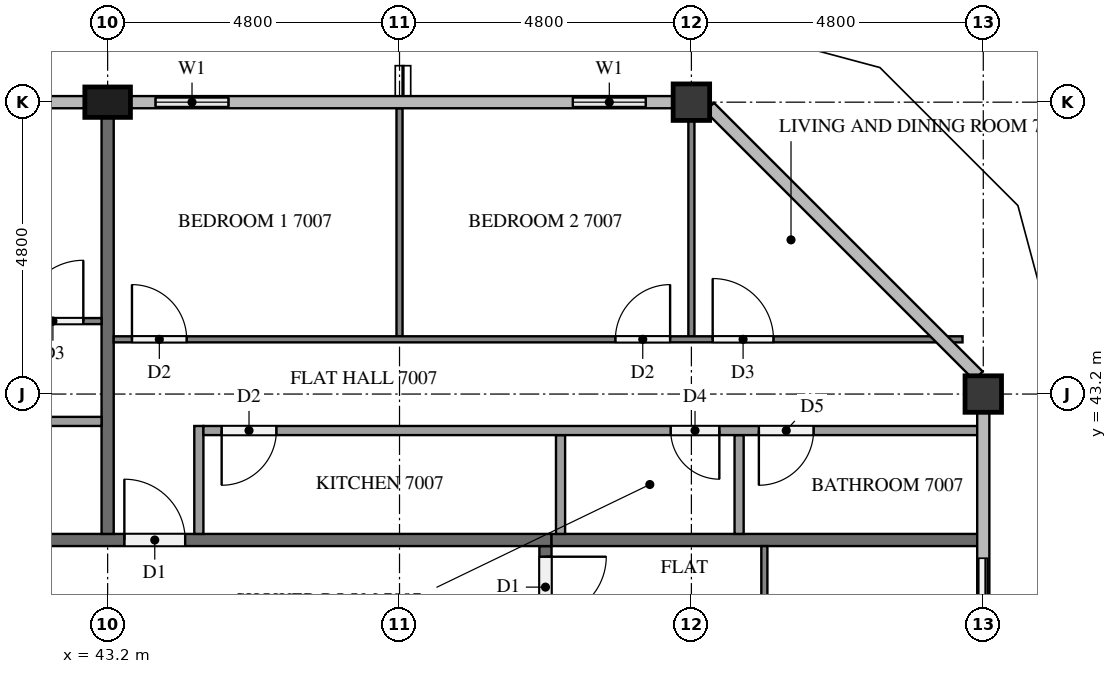
"""IFC4 building model, lengths in metres.
Left out: names, types, materials, properties, quantities, classifications, styles, units other than length and angle.
Written with IfcOpenShell. Run it as: python <this file> out.ifc"""

import sys

from ifc_helpers import new_model, si_unit, direction, frame, frame_2d, origin, origin_2d, place, context, subcontext, project, spatial, rectangle, extrude, element, fill, save


model = new_model("IFC4")
c1 = context("Model", 3, precision=1e-05, world=origin(), true_north=direction((0.0, 1.0)))
c2 = subcontext(c1, "Body", "Model", "MODEL_VIEW")
j1 = project(units=[si_unit("LENGTHUNIT", "METRE"), si_unit("PLANEANGLEUNIT", "RADIAN")], contexts=[c1])
p1 = place(None, origin())
s1 = spatial("IfcSite", under=j1, at=p1, CompositionType="ELEMENT")
p2 = place(p1, origin())
s2 = spatial("IfcBuilding", under=s1, at=p2, CompositionType="ELEMENT")
p3 = place(p2, frame((0.0, 0.0, 268.6)))
s3 = spatial("IfcBuildingStorey", under=s2, at=p3, CompositionType="ELEMENT", Elevation=268.6)
for number, where, z_axis, x_axis in (
    (1, (57.6, 43.2, 0.0), (0.0, 0.0, 1.0), (1.0, 0.0, 0.0)),
    (2, (52.8, 48.0, 0.0), (0.0, 0.0, 1.0), (1.0, 0.0, 0.0)),
):
    element("IfcColumn", number, at=place(p3, frame(where, z_axis=z_axis, x_axis=x_axis)), inside=s3, PredefinedType="COLUMN", context=c2, shape_type="SweptSolid", body=[
        extrude(rectangle(XDim=0.6, YDim=0.6, at=origin_2d()), origin(), (0.0, 0.0, 1.0), 3.2),
    ])
p4 = place(p3, frame((43.2, 48.0, 0.0), z_axis=(0.0, 0.0, 1.0), x_axis=(1.0, 0.0, 0.0)))
e3 = element("IfcColumn", 3, at=p4, inside=s3, PredefinedType="COLUMN", context=c2, shape_type="SweptSolid", body=[
    extrude(rectangle(XDim=0.75, YDim=0.5, at=origin_2d()), origin(), (0.0, 0.0, 1.0), 3.2),
])
p5 = place(p3, frame((57.6, 38.4, 0.0), z_axis=(0.0, 0.0, 1.0), x_axis=(0.0, 1.0, 0.0)))
e4 = element("IfcWall", 4, at=p5, inside=s3, PredefinedType="SOLIDWALL", context=c2, shape_type="SweptSolid", body=[
    extrude(rectangle(XDim=2.4, YDim=0.15, at=frame_2d((1.2, 0.0))), origin(), (0.0, 0.0, 1.0), 3.2),
])
p6 = place(p5, frame((0.3, 0.0, 0.0)))
e5 = element("IfcOpeningElement", 5, at=p6, cuts=e4, PredefinedType="OPENING", context=c2, shape_type="SweptSolid", body=[
    extrude(rectangle(XDim=1.8, YDim=2.4, at=frame_2d((0.9, 1.2))), frame((0.0, 0.085, 0.0), z_axis=(0.0, -1.0, 0.0), x_axis=(1.0, 0.0, 0.0)), (0.0, 0.0, 1.0), 0.17),
])
p7 = place(p3, frame((52.5, 48.0, 0.0), z_axis=(0.0, 0.0, 1.0), x_axis=(-1.0, 0.0, 0.0)))
e6 = element("IfcWall", 6, at=p7, inside=s3, PredefinedType="SOLIDWALL", context=c2, shape_type="SweptSolid", body=[
    extrude(rectangle(XDim=2.1, YDim=0.15, at=frame_2d((1.05, 0.0))), origin(), (0.0, 0.0, 1.0), 3.2),
])
p8 = place(p7, frame((0.45, 0.0, 0.9)))
e7 = element("IfcOpeningElement", 7, at=p8, cuts=e6, PredefinedType="OPENING", context=c2, shape_type="SweptSolid", body=[
    extrude(rectangle(XDim=1.2, YDim=1.4, at=frame_2d((0.6, 0.7))), frame((0.0, 0.085, 0.0), z_axis=(0.0, -1.0, 0.0), x_axis=(1.0, 0.0, 0.0)), (0.0, 0.0, 1.0), 0.17),
])
p9 = place(p3, frame((45.6, 48.0, 0.0), z_axis=(0.0, 0.0, 1.0), x_axis=(-1.0, 0.0, 0.0)))
e8 = element("IfcWall", 8, at=p9, inside=s3, PredefinedType="SOLIDWALL", context=c2, shape_type="SweptSolid", body=[
    extrude(rectangle(XDim=2.025, YDim=0.15, at=frame_2d((1.013, 0.0))), origin(), (0.0, 0.0, 1.0), 3.2),
])
p10 = place(p9, frame((0.413, 0.0, 0.9)))
e9 = element("IfcOpeningElement", 9, at=p10, cuts=e8, PredefinedType="OPENING", context=c2, shape_type="SweptSolid", body=[
    extrude(rectangle(XDim=1.2, YDim=1.4, at=frame_2d((0.6, 0.7))), frame((0.0, 0.085, 0.0), z_axis=(0.0, -1.0, 0.0), x_axis=(1.0, 0.0, 0.0)), (0.0, 0.0, 1.0), 0.17),
])
p11 = place(p3, frame((50.4, 40.7, 0.0), z_axis=(0.0, 0.0, 1.0), x_axis=(0.0, -1.0, 0.0)))
e10 = element("IfcWall", 10, at=p11, inside=s3, PredefinedType="PARTITIONING", context=c2, shape_type="SweptSolid", body=[
    extrude(rectangle(XDim=28.6, YDim=0.2, at=frame_2d((14.3, 0.0))), origin(), (0.0, 0.0, 1.0), 3.2),
])
p12 = place(p11, frame((27.425, 0.0, 0.0)))
e11 = element("IfcOpeningElement", 11, at=p12, cuts=e10, PredefinedType="OPENING", context=c2, shape_type="SweptSolid", body=[
    extrude(rectangle(XDim=1.0, YDim=2.1, at=frame_2d((0.5, 1.05))), frame((0.0, 0.11, 0.0), z_axis=(0.0, -1.0, 0.0), x_axis=(1.0, 0.0, 0.0)), (0.0, 0.0, 1.0), 0.22),
])
p13 = place(p11, frame((0.175, 0.0, 0.0)))
e12 = element("IfcOpeningElement", 12, at=p13, cuts=e10, PredefinedType="OPENING", context=c2, shape_type="SweptSolid", body=[
    extrude(rectangle(XDim=1.0, YDim=2.1, at=frame_2d((0.5, 1.05))), frame((0.0, 0.11, 0.0), z_axis=(0.0, -1.0, 0.0), x_axis=(1.0, 0.0, 0.0)), (0.0, 0.0, 1.0), 0.22),
])
p14 = place(p3, frame((11.9, 40.8, 0.0), z_axis=(0.0, 0.0, 1.0), x_axis=(1.0, 0.0, 0.0)))
e13 = element("IfcWall", 13, at=p14, inside=s3, PredefinedType="PARTITIONING", context=c2, shape_type="SweptSolid", body=[
    extrude(rectangle(XDim=38.6, YDim=0.2, at=frame_2d((19.3, 0.0))), origin(), (0.0, 0.0, 1.0), 3.2),
])
p15 = place(p14, frame((31.575, 0.0, 0.0)))
e14 = element("IfcOpeningElement", 14, at=p15, cuts=e13, PredefinedType="OPENING", context=c2, shape_type="SweptSolid", body=[
    extrude(rectangle(XDim=1.0, YDim=2.1, at=frame_2d((0.5, 1.05))), frame((0.0, 0.11, 0.0), z_axis=(0.0, -1.0, 0.0), x_axis=(1.0, 0.0, 0.0)), (0.0, 0.0, 1.0), 0.22),
])
p16 = place(p14, frame((24.375, 0.0, 0.0)))
e15 = element("IfcOpeningElement", 15, at=p16, cuts=e13, PredefinedType="OPENING", context=c2, shape_type="SweptSolid", body=[
    extrude(rectangle(XDim=1.0, YDim=2.1, at=frame_2d((0.5, 1.05))), frame((0.0, 0.11, 0.0), z_axis=(0.0, -1.0, 0.0), x_axis=(1.0, 0.0, 0.0)), (0.0, 0.0, 1.0), 0.22),
])
p17 = place(p14, frame((22.825, 0.0, 0.0)))
e16 = element("IfcOpeningElement", 16, at=p17, cuts=e13, PredefinedType="OPENING", context=c2, shape_type="SweptSolid", body=[
    extrude(rectangle(XDim=1.0, YDim=2.1, at=frame_2d((0.5, 1.05))), frame((0.0, 0.11, 0.0), z_axis=(0.0, -1.0, 0.0), x_axis=(1.0, 0.0, 0.0)), (0.0, 0.0, 1.0), 0.22),
])
p18 = place(p14, frame((0.375, 0.0, 0.0)))
e17 = element("IfcOpeningElement", 17, at=p18, cuts=e13, PredefinedType="OPENING", context=c2, shape_type="SweptSolid", body=[
    extrude(rectangle(XDim=1.0, YDim=2.1, at=frame_2d((0.5, 1.05))), frame((0.0, 0.11, 0.0), z_axis=(0.0, -1.0, 0.0), x_axis=(1.0, 0.0, 0.0)), (0.0, 0.0, 1.0), 0.22),
])
p19 = place(p3, frame((50.5, 40.8, 0.0), z_axis=(0.0, 0.0, 1.0), x_axis=(1.0, 0.0, 0.0)))
e18 = element("IfcWall", 18, at=p19, inside=s3, PredefinedType="PARTITIONING", context=c2, shape_type="SweptSolid", body=[
    extrude(rectangle(XDim=7.0, YDim=0.2, at=frame_2d((3.5, 0.0))), origin(), (0.0, 0.0, 1.0), 3.2),
])
p20 = place(p3, frame((43.2, 47.75, 0.0), z_axis=(0.0, 0.0, 1.0), x_axis=(0.0, -1.0, 0.0)))
e19 = element("IfcWall", 19, at=p20, inside=s3, PredefinedType="PARTITIONING", context=c2, shape_type="SweptSolid", body=[
    extrude(rectangle(XDim=6.85, YDim=0.2, at=frame_2d((3.425, 0.0))), origin(), (0.0, 0.0, 1.0), 3.2),
])
p21 = place(p3, frame((54.0, 40.7, 0.0), z_axis=(0.0, 0.0, 1.0), x_axis=(0.0, -1.0, 0.0)))
e20 = element("IfcWall", 20, at=p21, inside=s3, PredefinedType="PARTITIONING", context=c2, shape_type="SweptSolid", body=[
    extrude(rectangle(XDim=11.8, YDim=0.1, at=frame_2d((5.9, 0.0))), origin(), (0.0, 0.0, 1.0), 3.2),
])
p22 = place(p21, frame((5.75, 0.0, 0.0)))
e21 = element("IfcOpeningElement", 21, at=p22, cuts=e20, PredefinedType="OPENING", context=c2, shape_type="SweptSolid", body=[
    extrude(rectangle(XDim=1.0, YDim=2.1, at=frame_2d((0.5, 1.05))), frame((0.0, 0.06, 0.0), z_axis=(0.0, -1.0, 0.0), x_axis=(1.0, 0.0, 0.0)), (0.0, 0.0, 1.0), 0.12),
])
p23 = place(p21, frame((7.45, 0.0, 0.0)))
e22 = element("IfcOpeningElement", 22, at=p23, cuts=e20, PredefinedType="OPENING", context=c2, shape_type="SweptSolid", body=[
    extrude(rectangle(XDim=0.9, YDim=2.1, at=frame_2d((0.45, 1.05))), frame((0.0, 0.06, 0.0), z_axis=(0.0, -1.0, 0.0), x_axis=(1.0, 0.0, 0.0)), (0.0, 0.0, 1.0), 0.12),
])
p24 = place(p3, frame((48.0, 44.15, 0.0), z_axis=(0.0, 0.0, 1.0), x_axis=(0.0, 1.0, 0.0)))
e23 = element("IfcWall", 23, at=p24, inside=s3, PredefinedType="PARTITIONING", context=c2, shape_type="SweptSolid", body=[
    extrude(rectangle(XDim=3.75, YDim=0.1, at=frame_2d((1.875, 0.0))), origin(), (0.0, 0.0, 1.0), 3.2),
])
p25 = place(p3, frame((52.8, 44.15, 0.0), z_axis=(0.0, 0.0, 1.0), x_axis=(0.0, 1.0, 0.0)))
e24 = element("IfcWall", 24, at=p25, inside=s3, PredefinedType="PARTITIONING", context=c2, shape_type="SweptSolid", body=[
    extrude(rectangle(XDim=3.55, YDim=0.1, at=frame_2d((1.775, 0.0))), origin(), (0.0, 0.0, 1.0), 3.2),
])
p26 = place(p3, frame((43.3, 44.1, 0.0), z_axis=(0.0, 0.0, 1.0), x_axis=(1.0, 0.0, 0.0)))
e25 = element("IfcWall", 25, at=p26, inside=s3, PredefinedType="PARTITIONING", context=c2, shape_type="SweptSolid", body=[
    extrude(rectangle(XDim=13.959, YDim=0.1, at=frame_2d((6.979, 0.0))), origin(), (0.0, 0.0, 1.0), 3.2),
])
p27 = place(p26, frame((0.3, 0.0, 0.0)))
e26 = element("IfcOpeningElement", 26, at=p27, cuts=e25, PredefinedType="OPENING", context=c2, shape_type="SweptSolid", body=[
    extrude(rectangle(XDim=0.9, YDim=2.1, at=frame_2d((0.45, 1.05))), frame((0.0, 0.06, 0.0), z_axis=(0.0, -1.0, 0.0), x_axis=(1.0, 0.0, 0.0)), (0.0, 0.0, 1.0), 0.12),
])
p28 = place(p26, frame((8.25, 0.0, 0.0)))
e27 = element("IfcOpeningElement", 27, at=p28, cuts=e25, PredefinedType="OPENING", context=c2, shape_type="SweptSolid", body=[
    extrude(rectangle(XDim=0.9, YDim=2.1, at=frame_2d((0.45, 1.05))), frame((0.0, 0.06, 0.0), z_axis=(0.0, -1.0, 0.0), x_axis=(1.0, 0.0, 0.0)), (0.0, 0.0, 1.0), 0.12),
])
p29 = place(p26, frame((9.85, 0.0, 0.0)))
e28 = element("IfcOpeningElement", 28, at=p29, cuts=e25, PredefinedType="OPENING", context=c2, shape_type="SweptSolid", body=[
    extrude(rectangle(XDim=1.0, YDim=2.1, at=frame_2d((0.5, 1.05))), frame((0.0, 0.06, 0.0), z_axis=(0.0, -1.0, 0.0), x_axis=(1.0, 0.0, 0.0)), (0.0, 0.0, 1.0), 0.12),
])
for number, where, z_axis, x_axis in (
    (29, (50.648, 40.9, 0.0), (0.0, 0.0, 1.0), (0.0, 1.0, 0.0)),
    (30, (53.585, 40.9, 0.0), (0.0, 0.0, 1.0), (0.0, 1.0, 0.0)),
):
    element("IfcWall", number, at=place(p3, frame(where, z_axis=z_axis, x_axis=x_axis)), inside=s3, PredefinedType="PARTITIONING", context=c2, shape_type="SweptSolid", body=[
        extrude(rectangle(XDim=1.625, YDim=0.15, at=frame_2d((0.812, 0.0))), origin(), (0.0, 0.0, 1.0), 3.2),
    ])
p30 = place(p3, frame((44.7, 40.9, 0.0), z_axis=(0.0, 0.0, 1.0), x_axis=(0.0, 1.0, 0.0)))
e31 = element("IfcWall", 31, at=p30, inside=s3, PredefinedType="PARTITIONING", context=c2, shape_type="SweptSolid", body=[
    extrude(rectangle(XDim=1.775, YDim=0.15, at=frame_2d((0.888, 0.0))), origin(), (0.0, 0.0, 1.0), 3.2),
])
p31 = place(p3, frame((57.5, 42.6, 0.0), z_axis=(0.0, 0.0, 1.0), x_axis=(-1.0, 0.0, 0.0)))
e32 = element("IfcWall", 32, at=p31, inside=s3, PredefinedType="PARTITIONING", context=c2, shape_type="SweptSolid", body=[
    extrude(rectangle(XDim=12.725, YDim=0.15, at=frame_2d((6.363, 0.0))), origin(), (0.0, 0.0, 1.0), 3.2),
])
p32 = place(p31, frame((11.525, 0.0, 0.0)))
e33 = element("IfcOpeningElement", 33, at=p32, cuts=e32, PredefinedType="OPENING", context=c2, shape_type="SweptSolid", body=[
    extrude(rectangle(XDim=0.9, YDim=2.1, at=frame_2d((0.45, 1.05))), frame((0.0, 0.085, 0.0), z_axis=(0.0, -1.0, 0.0), x_axis=(1.0, 0.0, 0.0)), (0.0, 0.0, 1.0), 0.17),
])
p33 = place(p31, frame((4.24, 0.0, 0.0)))
e34 = element("IfcOpeningElement", 34, at=p33, cuts=e32, PredefinedType="OPENING", context=c2, shape_type="SweptSolid", body=[
    extrude(rectangle(XDim=0.8, YDim=2.1, at=frame_2d((0.4, 1.05))), frame((0.0, 0.085, 0.0), z_axis=(0.0, -1.0, 0.0), x_axis=(1.0, 0.0, 0.0)), (0.0, 0.0, 1.0), 0.17),
])
p34 = place(p31, frame((2.69, 0.0, 0.0)))
e35 = element("IfcOpeningElement", 35, at=p34, cuts=e32, PredefinedType="OPENING", context=c2, shape_type="SweptSolid", body=[
    extrude(rectangle(XDim=0.9, YDim=2.1, at=frame_2d((0.45, 1.05))), frame((0.0, 0.085, 0.0), z_axis=(0.0, -1.0, 0.0), x_axis=(1.0, 0.0, 0.0)), (0.0, 0.0, 1.0), 0.17),
])
p35 = place(p3, frame((36.1, 44.4, 0.0), z_axis=(0.0, 0.0, 1.0), x_axis=(1.0, 0.0, 0.0)))
e36 = element("IfcWall", 36, at=p35, inside=s3, PredefinedType="PARTITIONING", context=c2, shape_type="SweptSolid", body=[
    extrude(rectangle(XDim=7.0, YDim=0.1, at=frame_2d((3.5, 0.0))), origin(), (0.0, 0.0, 1.0), 3.2),
])
p36 = place(p35, frame((5.7, 0.0, 0.0)))
e37 = element("IfcOpeningElement", 37, at=p36, cuts=e36, PredefinedType="OPENING", context=c2, shape_type="SweptSolid", body=[
    extrude(rectangle(XDim=1.0, YDim=2.1, at=frame_2d((0.5, 1.05))), frame((0.0, 0.06, 0.0), z_axis=(0.0, -1.0, 0.0), x_axis=(1.0, 0.0, 0.0)), (0.0, 0.0, 1.0), 0.12),
])
p37 = place(p3, frame((43.1, 42.75, 0.0), z_axis=(0.0, 0.0, 1.0), x_axis=(-1.0, 0.0, 0.0)))
e38 = element("IfcWall", 38, at=p37, inside=s3, PredefinedType="PARTITIONING", context=c2, shape_type="SweptSolid", body=[
    extrude(rectangle(XDim=5.525, YDim=0.15, at=frame_2d((2.763, 0.0))), origin(), (0.0, 0.0, 1.0), 3.2),
])
p38 = place(p37, frame((3.64, 0.0, 0.0)))
e39 = element("IfcOpeningElement", 39, at=p38, cuts=e38, PredefinedType="OPENING", context=c2, shape_type="SweptSolid", body=[
    extrude(rectangle(XDim=0.8, YDim=2.1, at=frame_2d((0.4, 1.05))), frame((0.0, 0.085, 0.0), z_axis=(0.0, -1.0, 0.0), x_axis=(1.0, 0.0, 0.0)), (0.0, 0.0, 1.0), 0.17),
])
p39 = place(p37, frame((2.09, 0.0, 0.0)))
e40 = element("IfcOpeningElement", 40, at=p39, cuts=e38, PredefinedType="OPENING", context=c2, shape_type="SweptSolid", body=[
    extrude(rectangle(XDim=0.9, YDim=2.1, at=frame_2d((0.45, 1.05))), frame((0.0, 0.085, 0.0), z_axis=(0.0, -1.0, 0.0), x_axis=(1.0, 0.0, 0.0)), (0.0, 0.0, 1.0), 0.17),
])
p40 = place(p6, origin())
e41 = element("IfcDoor", 41, at=p40, inside=s3, OperationType="SLIDING_TO_LEFT", PredefinedType="DOOR", context=c2, shape_type="SweptSolid", body=[
    extrude(rectangle(XDim=1.8, YDim=2.4, at=frame_2d((0.9, 1.2))), frame((0.0, 0.025, 0.0), z_axis=(0.0, -1.0, 0.0), x_axis=(1.0, 0.0, 0.0)), (0.0, 0.0, 1.0), 0.05),
])
fill(e5, e41)
p41 = place(p8, origin())
e42 = element("IfcWindow", 42, at=p41, inside=s3, PartitioningType="SINGLE_PANEL", PredefinedType="WINDOW", context=c2, shape_type="SweptSolid", body=[
    extrude(rectangle(XDim=1.2, YDim=1.4, at=frame_2d((0.6, 0.7))), frame((0.0, 0.03, 0.0), z_axis=(0.0, -1.0, 0.0), x_axis=(1.0, 0.0, 0.0)), (0.0, 0.0, 1.0), 0.06),
])
fill(e7, e42)
p42 = place(p10, origin())
e43 = element("IfcWindow", 43, at=p42, inside=s3, PartitioningType="SINGLE_PANEL", PredefinedType="WINDOW", context=c2, shape_type="SweptSolid", body=[
    extrude(rectangle(XDim=1.2, YDim=1.4, at=frame_2d((0.6, 0.7))), frame((0.0, 0.03, 0.0), z_axis=(0.0, -1.0, 0.0), x_axis=(1.0, 0.0, 0.0)), (0.0, 0.0, 1.0), 0.06),
])
fill(e9, e43)
p43 = place(p13, origin())
e44 = element("IfcDoor", 44, at=p43, inside=s3, OperationType="SINGLE_SWING_LEFT", PredefinedType="DOOR", context=c2, shape_type="SweptSolid", body=[
    extrude(rectangle(XDim=1.0, YDim=2.1, at=frame_2d((0.5, 1.05))), frame((0.0, 0.025, 0.0), z_axis=(0.0, -1.0, 0.0), x_axis=(1.0, 0.0, 0.0)), (0.0, 0.0, 1.0), 0.05),
])
fill(e12, e44)
p44 = place(p15, origin())
e45 = element("IfcDoor", 45, at=p44, inside=s3, OperationType="SINGLE_SWING_LEFT", PredefinedType="DOOR", context=c2, shape_type="SweptSolid", body=[
    extrude(rectangle(XDim=1.0, YDim=2.1, at=frame_2d((0.5, 1.05))), frame((0.0, 0.025, 0.0), z_axis=(0.0, -1.0, 0.0), x_axis=(1.0, 0.0, 0.0)), (0.0, 0.0, 1.0), 0.05),
])
fill(e14, e45)
p45 = place(p27, origin())
e46 = element("IfcDoor", 46, at=p45, inside=s3, OperationType="SINGLE_SWING_LEFT", PredefinedType="DOOR", context=c2, shape_type="SweptSolid", body=[
    extrude(rectangle(XDim=0.9, YDim=2.1, at=frame_2d((0.45, 1.05))), frame((0.0, 0.025, 0.0), z_axis=(0.0, -1.0, 0.0), x_axis=(1.0, 0.0, 0.0)), (0.0, 0.0, 1.0), 0.05),
])
fill(e26, e46)
p46 = place(p28, origin())
e47 = element("IfcDoor", 47, at=p46, inside=s3, OperationType="SINGLE_SWING_RIGHT", PredefinedType="DOOR", context=c2, shape_type="SweptSolid", body=[
    extrude(rectangle(XDim=0.9, YDim=2.1, at=frame_2d((0.45, 1.05))), frame((0.0, 0.025, 0.0), z_axis=(0.0, -1.0, 0.0), x_axis=(1.0, 0.0, 0.0)), (0.0, 0.0, 1.0), 0.05),
])
fill(e27, e47)
p47 = place(p29, origin())
e48 = element("IfcDoor", 48, at=p47, inside=s3, OperationType="SINGLE_SWING_LEFT", PredefinedType="DOOR", context=c2, shape_type="SweptSolid", body=[
    extrude(rectangle(XDim=1.0, YDim=2.1, at=frame_2d((0.5, 1.05))), frame((0.0, 0.025, 0.0), z_axis=(0.0, -1.0, 0.0), x_axis=(1.0, 0.0, 0.0)), (0.0, 0.0, 1.0), 0.05),
])
fill(e28, e48)
p48 = place(p32, origin())
e49 = element("IfcDoor", 49, at=p48, inside=s3, OperationType="SINGLE_SWING_RIGHT", PredefinedType="DOOR", context=c2, shape_type="SweptSolid", body=[
    extrude(rectangle(XDim=0.9, YDim=2.1, at=frame_2d((0.45, 1.05))), frame((0.0, 0.025, 0.0), z_axis=(0.0, -1.0, 0.0), x_axis=(1.0, 0.0, 0.0)), (0.0, 0.0, 1.0), 0.05),
])
fill(e33, e49)
p49 = place(p33, origin())
e50 = element("IfcDoor", 50, at=p49, inside=s3, OperationType="SINGLE_SWING_LEFT", PredefinedType="DOOR", context=c2, shape_type="SweptSolid", body=[
    extrude(rectangle(XDim=0.8, YDim=2.1, at=frame_2d((0.4, 1.05))), frame((0.0, 0.025, 0.0), z_axis=(0.0, -1.0, 0.0), x_axis=(1.0, 0.0, 0.0)), (0.0, 0.0, 1.0), 0.05),
])
fill(e34, e50)
p50 = place(p34, origin())
e51 = element("IfcDoor", 51, at=p50, inside=s3, OperationType="SINGLE_SWING_RIGHT", PredefinedType="DOOR", context=c2, shape_type="SweptSolid", body=[
    extrude(rectangle(XDim=0.9, YDim=2.1, at=frame_2d((0.45, 1.05))), frame((0.0, 0.025, 0.0), z_axis=(0.0, -1.0, 0.0), x_axis=(1.0, 0.0, 0.0)), (0.0, 0.0, 1.0), 0.05),
])
fill(e35, e51)
p51 = place(p36, origin())
e52 = element("IfcDoor", 52, at=p51, inside=s3, OperationType="SINGLE_SWING_RIGHT", PredefinedType="DOOR", context=c2, shape_type="SweptSolid", body=[
    extrude(rectangle(XDim=1.0, YDim=2.1, at=frame_2d((0.5, 1.05))), frame((0.0, 0.025, 0.0), z_axis=(0.0, -1.0, 0.0), x_axis=(1.0, 0.0, 0.0)), (0.0, 0.0, 1.0), 0.05),
])
fill(e37, e52)
save(model, sys.argv[1])
